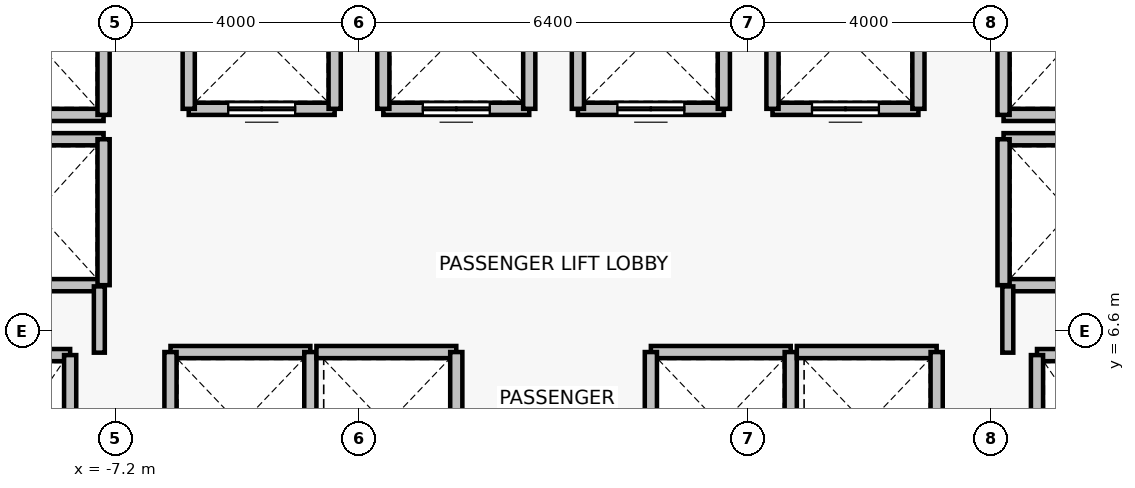
"""IFC4 building model, lengths in metres.
Left out: names, types, materials, properties, quantities, classifications, styles, units other than length and angle.
Written with IfcOpenShell. Run it as: python <this file> out.ifc"""

import sys

from ifc_helpers import new_model, si_unit, direction, frame, frame_2d, origin, place, context, subcontext, project, spatial, rectangle, extrude, source, transform, mapped, element, fill, save


model = new_model("IFC4")
c1 = context("Model", 3, precision=1e-05, world=origin(), true_north=direction((0.0, 1.0)))
c2 = subcontext(c1, "Body", "Model", "MODEL_VIEW")
j1 = project(units=[si_unit("LENGTHUNIT", "METRE"), si_unit("PLANEANGLEUNIT", "RADIAN")], contexts=[c1])
p1 = place(None, origin())
s1 = spatial("IfcSite", under=j1, at=p1, CompositionType="ELEMENT")
p2 = place(p1, origin())
s2 = spatial("IfcBuilding", under=s1, at=p2, CompositionType="ELEMENT")
p3 = place(p2, frame((0.0, 0.0, 47.2)))
s3 = spatial("IfcBuildingStorey", under=s2, at=p3, CompositionType="ELEMENT", Elevation=47.2)
p4 = place(p3, frame((-9.95, 6.2, 0.0), z_axis=(0.0, 0.0, 1.0), x_axis=(1.0, 0.0, 0.0)))
e1 = element("IfcWall", 1, at=p4, inside=s3, PredefinedType="SOLIDWALL", context=c2, shape_type="SweptSolid", body=[
    extrude(rectangle(XDim=2.0, YDim=0.2, at=frame_2d((1.0, 0.0))), origin(), (0.0, 0.0, 1.0), 3.075),
])
p5 = place(p3, frame((-7.95, 6.2, 0.0), z_axis=(0.0, 0.0, 1.0), x_axis=(0.0, -1.0, 0.0)))
e2 = element("IfcWall", 2, at=p5, inside=s3, PredefinedType="SOLIDWALL", context=c2, shape_type="SweptSolid", body=[
    extrude(rectangle(XDim=2.8, YDim=0.2, at=frame_2d((1.4, 0.0))), origin(), (0.0, 0.0, 1.0), 3.075),
])
p6 = place(p3, frame((7.95, 6.2, 0.0), z_axis=(0.0, 0.0, 1.0), x_axis=(1.0, 0.0, 0.0)))
e3 = element("IfcWall", 3, at=p6, inside=s3, PredefinedType="SOLIDWALL", context=c2, shape_type="SweptSolid", body=[
    extrude(rectangle(XDim=2.0, YDim=0.2, at=frame_2d((1.0, 0.0))), origin(), (0.0, 0.0, 1.0), 3.075),
])
p7 = place(p3, frame((7.95, 3.4, 0.0), z_axis=(0.0, 0.0, 1.0), x_axis=(0.0, 1.0, 0.0)))
e4 = element("IfcWall", 4, at=p7, inside=s3, PredefinedType="SOLIDWALL", context=c2, shape_type="SweptSolid", body=[
    extrude(rectangle(XDim=2.8, YDim=0.2, at=frame_2d((1.4, 0.0))), origin(), (0.0, 0.0, 1.0), 3.075),
])
p8 = place(p3, frame((-3.6, 10.25, 0.0), z_axis=(0.0, 0.0, 1.0), x_axis=(-1.0, 0.0, 0.0)))
e5 = element("IfcWall", 5, at=p8, inside=s3, PredefinedType="SOLIDWALL", context=c2, shape_type="SweptSolid", body=[
    extrude(rectangle(XDim=2.4, YDim=0.2, at=frame_2d((1.2, 0.0))), origin(), (0.0, 0.0, 1.0), 3.075),
])
p9 = place(p8, frame((0.65, 0.0, 0.0)))
e6 = element("IfcOpeningElement", 6, at=p9, cuts=e5, PredefinedType="OPENING", context=c2, shape_type="SweptSolid", body=[
    extrude(rectangle(XDim=1.1, YDim=2.2, at=frame_2d((0.55, 1.1))), frame((0.0, 0.11, 0.0), z_axis=(0.0, -1.0, 0.0), x_axis=(1.0, 0.0, 0.0)), (0.0, 0.0, 1.0), 0.22),
])
for number, where, z_axis, x_axis in (
    (7, (-6.0, 10.25, 0.0), (0.0, 0.0, 1.0), (0.0, 1.0, 0.0)),
    (8, (-3.6, 12.65, 0.0), (0.0, 0.0, 1.0), (0.0, -1.0, 0.0)),
):
    element("IfcWall", number, at=place(p3, frame(where, z_axis=z_axis, x_axis=x_axis)), inside=s3, PredefinedType="SOLIDWALL", context=c2, shape_type="SweptSolid", body=[
        extrude(rectangle(XDim=2.4, YDim=0.2, at=frame_2d((1.2, 0.0))), origin(), (0.0, 0.0, 1.0), 3.075),
    ])
p10 = place(p3, frame((-0.4, 10.25, 0.0), z_axis=(0.0, 0.0, 1.0), x_axis=(-1.0, 0.0, 0.0)))
e9 = element("IfcWall", 9, at=p10, inside=s3, PredefinedType="SOLIDWALL", context=c2, shape_type="SweptSolid", body=[
    extrude(rectangle(XDim=2.4, YDim=0.2, at=frame_2d((1.2, 0.0))), origin(), (0.0, 0.0, 1.0), 3.075),
])
p11 = place(p10, frame((0.65, 0.0, 0.0)))
e10 = element("IfcOpeningElement", 10, at=p11, cuts=e9, PredefinedType="OPENING", context=c2, shape_type="SweptSolid", body=[
    extrude(rectangle(XDim=1.1, YDim=2.2, at=frame_2d((0.55, 1.1))), frame((0.0, 0.11, 0.0), z_axis=(0.0, -1.0, 0.0), x_axis=(1.0, 0.0, 0.0)), (0.0, 0.0, 1.0), 0.22),
])
for number, where, z_axis, x_axis in (
    (11, (-2.8, 10.25, 0.0), (0.0, 0.0, 1.0), (0.0, 1.0, 0.0)),
    (12, (-0.4, 12.65, 0.0), (0.0, 0.0, 1.0), (0.0, -1.0, 0.0)),
):
    element("IfcWall", number, at=place(p3, frame(where, z_axis=z_axis, x_axis=x_axis)), inside=s3, PredefinedType="SOLIDWALL", context=c2, shape_type="SweptSolid", body=[
        extrude(rectangle(XDim=2.4, YDim=0.2, at=frame_2d((1.2, 0.0))), origin(), (0.0, 0.0, 1.0), 3.075),
    ])
p12 = place(p3, frame((2.8, 10.25, 0.0), z_axis=(0.0, 0.0, 1.0), x_axis=(-1.0, 0.0, 0.0)))
e13 = element("IfcWall", 13, at=p12, inside=s3, PredefinedType="SOLIDWALL", context=c2, shape_type="SweptSolid", body=[
    extrude(rectangle(XDim=2.4, YDim=0.2, at=frame_2d((1.2, 0.0))), origin(), (0.0, 0.0, 1.0), 3.075),
])
p13 = place(p12, frame((0.65, 0.0, 0.0)))
e14 = element("IfcOpeningElement", 14, at=p13, cuts=e13, PredefinedType="OPENING", context=c2, shape_type="SweptSolid", body=[
    extrude(rectangle(XDim=1.1, YDim=2.2, at=frame_2d((0.55, 1.1))), frame((0.0, 0.11, 0.0), z_axis=(0.0, -1.0, 0.0), x_axis=(1.0, 0.0, 0.0)), (0.0, 0.0, 1.0), 0.22),
])
for number, where, z_axis, x_axis in (
    (15, (0.4, 10.25, 0.0), (0.0, 0.0, 1.0), (0.0, 1.0, 0.0)),
    (16, (2.8, 12.65, 0.0), (0.0, 0.0, 1.0), (0.0, -1.0, 0.0)),
):
    element("IfcWall", number, at=place(p3, frame(where, z_axis=z_axis, x_axis=x_axis)), inside=s3, PredefinedType="SOLIDWALL", context=c2, shape_type="SweptSolid", body=[
        extrude(rectangle(XDim=2.4, YDim=0.2, at=frame_2d((1.2, 0.0))), origin(), (0.0, 0.0, 1.0), 3.075),
    ])
p14 = place(p3, frame((6.0, 10.25, 0.0), z_axis=(0.0, 0.0, 1.0), x_axis=(-1.0, 0.0, 0.0)))
e17 = element("IfcWall", 17, at=p14, inside=s3, PredefinedType="SOLIDWALL", context=c2, shape_type="SweptSolid", body=[
    extrude(rectangle(XDim=2.4, YDim=0.2, at=frame_2d((1.2, 0.0))), origin(), (0.0, 0.0, 1.0), 3.075),
])
p15 = place(p14, frame((0.65, 0.0, 0.0)))
e18 = element("IfcOpeningElement", 18, at=p15, cuts=e17, PredefinedType="OPENING", context=c2, shape_type="SweptSolid", body=[
    extrude(rectangle(XDim=1.1, YDim=2.2, at=frame_2d((0.55, 1.1))), frame((0.0, 0.11, 0.0), z_axis=(0.0, -1.0, 0.0), x_axis=(1.0, 0.0, 0.0)), (0.0, 0.0, 1.0), 0.22),
])
for number, where, z_axis, x_axis in (
    (19, (3.6, 10.25, 0.0), (0.0, 0.0, 1.0), (0.0, 1.0, 0.0)),
    (20, (6.0, 12.65, 0.0), (0.0, 0.0, 1.0), (0.0, -1.0, 0.0)),
):
    element("IfcWall", number, at=place(p3, frame(where, z_axis=z_axis, x_axis=x_axis)), inside=s3, PredefinedType="SOLIDWALL", context=c2, shape_type="SweptSolid", body=[
        extrude(rectangle(XDim=2.4, YDim=0.2, at=frame_2d((1.2, 0.0))), origin(), (0.0, 0.0, 1.0), 3.075),
    ])
p16 = place(p3, frame((-6.3, 6.25, 0.0), z_axis=(0.0, 0.0, 1.0), x_axis=(1.0, 0.0, 0.0)))
e21 = element("IfcWall", 21, at=p16, inside=s3, PredefinedType="SOLIDWALL", context=c2, shape_type="SweptSolid", body=[
    extrude(rectangle(XDim=2.3, YDim=0.2, at=frame_2d((1.15, 0.0))), origin(), (0.0, 0.0, 1.0), 3.075),
])
for number, where, z_axis, x_axis in (
    (22, (-6.3, 3.85, 0.0), (0.0, 0.0, 1.0), (0.0, 1.0, 0.0)),
    (23, (-4.0, 6.25, 0.0), (0.0, 0.0, 1.0), (0.0, -1.0, 0.0)),
):
    element("IfcWall", number, at=place(p3, frame(where, z_axis=z_axis, x_axis=x_axis)), inside=s3, PredefinedType="SOLIDWALL", context=c2, shape_type="SweptSolid", body=[
        extrude(rectangle(XDim=2.4, YDim=0.2, at=frame_2d((1.2, 0.0))), origin(), (0.0, 0.0, 1.0), 3.075),
    ])
p17 = place(p3, frame((-3.9, 6.25, 0.0), z_axis=(0.0, 0.0, 1.0), x_axis=(1.0, 0.0, 0.0)))
e24 = element("IfcWall", 24, at=p17, inside=s3, PredefinedType="SOLIDWALL", context=c2, shape_type="SweptSolid", body=[
    extrude(rectangle(XDim=2.3, YDim=0.2, at=frame_2d((1.15, 0.0))), origin(), (0.0, 0.0, 1.0), 3.075),
])
p18 = place(p3, frame((-1.6, 6.25, 0.0), z_axis=(0.0, 0.0, 1.0), x_axis=(0.0, -1.0, 0.0)))
e25 = element("IfcWall", 25, at=p18, inside=s3, PredefinedType="SOLIDWALL", context=c2, shape_type="SweptSolid", body=[
    extrude(rectangle(XDim=2.4, YDim=0.2, at=frame_2d((1.2, 0.0))), origin(), (0.0, 0.0, 1.0), 3.075),
])
p19 = place(p3, frame((1.6, 6.25, 0.0), z_axis=(0.0, 0.0, 1.0), x_axis=(1.0, 0.0, 0.0)))
e26 = element("IfcWall", 26, at=p19, inside=s3, PredefinedType="SOLIDWALL", context=c2, shape_type="SweptSolid", body=[
    extrude(rectangle(XDim=2.3, YDim=0.2, at=frame_2d((1.15, 0.0))), origin(), (0.0, 0.0, 1.0), 3.075),
])
for number, where, z_axis, x_axis in (
    (27, (1.6, 3.85, 0.0), (0.0, 0.0, 1.0), (0.0, 1.0, 0.0)),
    (28, (3.9, 6.25, 0.0), (0.0, 0.0, 1.0), (0.0, -1.0, 0.0)),
):
    element("IfcWall", number, at=place(p3, frame(where, z_axis=z_axis, x_axis=x_axis)), inside=s3, PredefinedType="SOLIDWALL", context=c2, shape_type="SweptSolid", body=[
        extrude(rectangle(XDim=2.4, YDim=0.2, at=frame_2d((1.2, 0.0))), origin(), (0.0, 0.0, 1.0), 3.075),
    ])
p20 = place(p3, frame((4.0, 6.25, 0.0), z_axis=(0.0, 0.0, 1.0), x_axis=(1.0, 0.0, 0.0)))
e29 = element("IfcWall", 29, at=p20, inside=s3, PredefinedType="SOLIDWALL", context=c2, shape_type="SweptSolid", body=[
    extrude(rectangle(XDim=2.3, YDim=0.2, at=frame_2d((1.15, 0.0))), origin(), (0.0, 0.0, 1.0), 3.075),
])
p21 = place(p3, frame((6.3, 6.25, 0.0), z_axis=(0.0, 0.0, 1.0), x_axis=(0.0, -1.0, 0.0)))
e30 = element("IfcWall", 30, at=p21, inside=s3, PredefinedType="SOLIDWALL", context=c2, shape_type="SweptSolid", body=[
    extrude(rectangle(XDim=2.4, YDim=0.2, at=frame_2d((1.2, 0.0))), origin(), (0.0, 0.0, 1.0), 3.075),
])
for number, where, z_axis, x_axis in (
    (31, (-7.4, 7.35, 0.0), (0.0, 0.0, 1.0), (-1.0, 0.0, 0.0)),
    (32, (-9.6, 9.75, 0.0), (0.0, 0.0, 1.0), (1.0, 0.0, 0.0)),
):
    element("IfcWall", number, at=place(p3, frame(where, z_axis=z_axis, x_axis=x_axis)), inside=s3, PredefinedType="SOLIDWALL", context=c2, shape_type="SweptSolid", body=[
        extrude(rectangle(XDim=2.2, YDim=0.2, at=frame_2d((1.1, 0.0))), origin(), (0.0, 0.0, 1.0), 2.465),
    ])
p22 = place(p3, frame((-7.4, 9.75, 0.0), z_axis=(0.0, 0.0, 1.0), x_axis=(0.0, -1.0, 0.0)))
e33 = element("IfcWall", 33, at=p22, inside=s3, PredefinedType="SOLIDWALL", context=c2, shape_type="SweptSolid", body=[
    extrude(rectangle(XDim=2.4, YDim=0.2, at=frame_2d((1.2, 0.0))), origin(), (0.0, 0.0, 1.0), 2.465),
])
p23 = place(p3, frame((-7.4, 10.15, 0.0), z_axis=(0.0, 0.0, 1.0), x_axis=(-1.0, 0.0, 0.0)))
e34 = element("IfcWall", 34, at=p23, inside=s3, PredefinedType="SOLIDWALL", context=c2, shape_type="SweptSolid", body=[
    extrude(rectangle(XDim=2.2, YDim=0.2, at=frame_2d((1.1, 0.0))), origin(), (0.0, 0.0, 1.0), 2.465),
])
p24 = place(p3, frame((-7.4, 12.55, 0.0), z_axis=(0.0, 0.0, 1.0), x_axis=(0.0, -1.0, 0.0)))
e35 = element("IfcWall", 35, at=p24, inside=s3, PredefinedType="SOLIDWALL", context=c2, shape_type="SweptSolid", body=[
    extrude(rectangle(XDim=2.4, YDim=0.2, at=frame_2d((1.2, 0.0))), origin(), (0.0, 0.0, 1.0), 2.465),
])
for number, where, z_axis, x_axis in (
    (36, (9.6, 7.35, 0.0), (0.0, 0.0, 1.0), (-1.0, 0.0, 0.0)),
    (37, (7.4, 9.75, 0.0), (0.0, 0.0, 1.0), (1.0, 0.0, 0.0)),
):
    element("IfcWall", number, at=place(p3, frame(where, z_axis=z_axis, x_axis=x_axis)), inside=s3, PredefinedType="SOLIDWALL", context=c2, shape_type="SweptSolid", body=[
        extrude(rectangle(XDim=2.2, YDim=0.2, at=frame_2d((1.1, 0.0))), origin(), (0.0, 0.0, 1.0), 2.465),
    ])
p25 = place(p3, frame((7.4, 7.35, 0.0), z_axis=(0.0, 0.0, 1.0), x_axis=(0.0, 1.0, 0.0)))
e38 = element("IfcWall", 38, at=p25, inside=s3, PredefinedType="SOLIDWALL", context=c2, shape_type="SweptSolid", body=[
    extrude(rectangle(XDim=2.4, YDim=0.2, at=frame_2d((1.2, 0.0))), origin(), (0.0, 0.0, 1.0), 2.465),
])
p26 = place(p3, frame((9.6, 10.15, 0.0), z_axis=(0.0, 0.0, 1.0), x_axis=(-1.0, 0.0, 0.0)))
e39 = element("IfcWall", 39, at=p26, inside=s3, PredefinedType="SOLIDWALL", context=c2, shape_type="SweptSolid", body=[
    extrude(rectangle(XDim=2.2, YDim=0.2, at=frame_2d((1.1, 0.0))), origin(), (0.0, 0.0, 1.0), 2.465),
])
p27 = place(p3, frame((7.4, 10.15, 0.0), z_axis=(0.0, 0.0, 1.0), x_axis=(0.0, 1.0, 0.0)))
e40 = element("IfcWall", 40, at=p27, inside=s3, PredefinedType="SOLIDWALL", context=c2, shape_type="SweptSolid", body=[
    extrude(rectangle(XDim=2.4, YDim=0.2, at=frame_2d((1.2, 0.0))), origin(), (0.0, 0.0, 1.0), 2.465),
])
for number, where, z_axis, x_axis in (
    (41, (-7.47, 7.33, 0.0), (0.0, 0.0, 1.0), (0.0, -1.0, 0.0)),
    (42, (7.47, 6.24, 0.0), (0.0, 0.0, 1.0), (0.0, 1.0, 0.0)),
):
    element("IfcWall", number, at=place(p3, frame(where, z_axis=z_axis, x_axis=x_axis)), inside=s3, PredefinedType="PARTITIONING", context=c2, shape_type="SweptSolid", body=[
        extrude(rectangle(XDim=1.09, YDim=0.18, at=frame_2d((0.545, 0.0))), origin(), (0.0, 0.0, 1.0), 2.465),
    ])
m1 = source(origin(), c2, "Body", "SweptSolid", [
    extrude(rectangle(XDim=1.1, YDim=2.2, at=frame_2d((0.55, 1.1))), frame((0.0, 0.025, 0.0), z_axis=(0.0, -1.0, 0.0), x_axis=(1.0, 0.0, 0.0)), (0.0, 0.0, 1.0), 0.05),
])
p28 = place(p9, origin())
e43 = element("IfcDoor", 43, at=p28, inside=s3, OperationType="DOUBLE_DOOR_SLIDING", PredefinedType="DOOR", context=c2, shape_type="MappedRepresentation", body=[
    mapped(m1, transform((0.0, 0.0, 0.0), x_axis=(1.0, 0.0, 0.0), y_axis=(0.0, 1.0, 0.0), z_axis=(0.0, 0.0, 1.0), scale=1.0)),
])
fill(e6, e43)
p29 = place(p11, origin())
e44 = element("IfcDoor", 44, at=p29, inside=s3, OperationType="DOUBLE_DOOR_SLIDING", PredefinedType="DOOR", context=c2, shape_type="MappedRepresentation", body=[
    mapped(m1, transform((0.0, 0.0, 0.0), x_axis=(1.0, 0.0, 0.0), y_axis=(0.0, 1.0, 0.0), z_axis=(0.0, 0.0, 1.0), scale=1.0)),
])
fill(e10, e44)
p30 = place(p13, origin())
e45 = element("IfcDoor", 45, at=p30, inside=s3, OperationType="DOUBLE_DOOR_SLIDING", PredefinedType="DOOR", context=c2, shape_type="MappedRepresentation", body=[
    mapped(m1, transform((0.0, 0.0, 0.0), x_axis=(1.0, 0.0, 0.0), y_axis=(0.0, 1.0, 0.0), z_axis=(0.0, 0.0, 1.0), scale=1.0)),
])
fill(e14, e45)
p31 = place(p15, origin())
e46 = element("IfcDoor", 46, at=p31, inside=s3, OperationType="DOUBLE_DOOR_SLIDING", PredefinedType="DOOR", context=c2, shape_type="MappedRepresentation", body=[
    mapped(m1, transform((0.0, 0.0, 0.0), x_axis=(1.0, 0.0, 0.0), y_axis=(0.0, 1.0, 0.0), z_axis=(0.0, 0.0, 1.0), scale=1.0)),
])
fill(e18, e46)
save(model, sys.argv[1])
